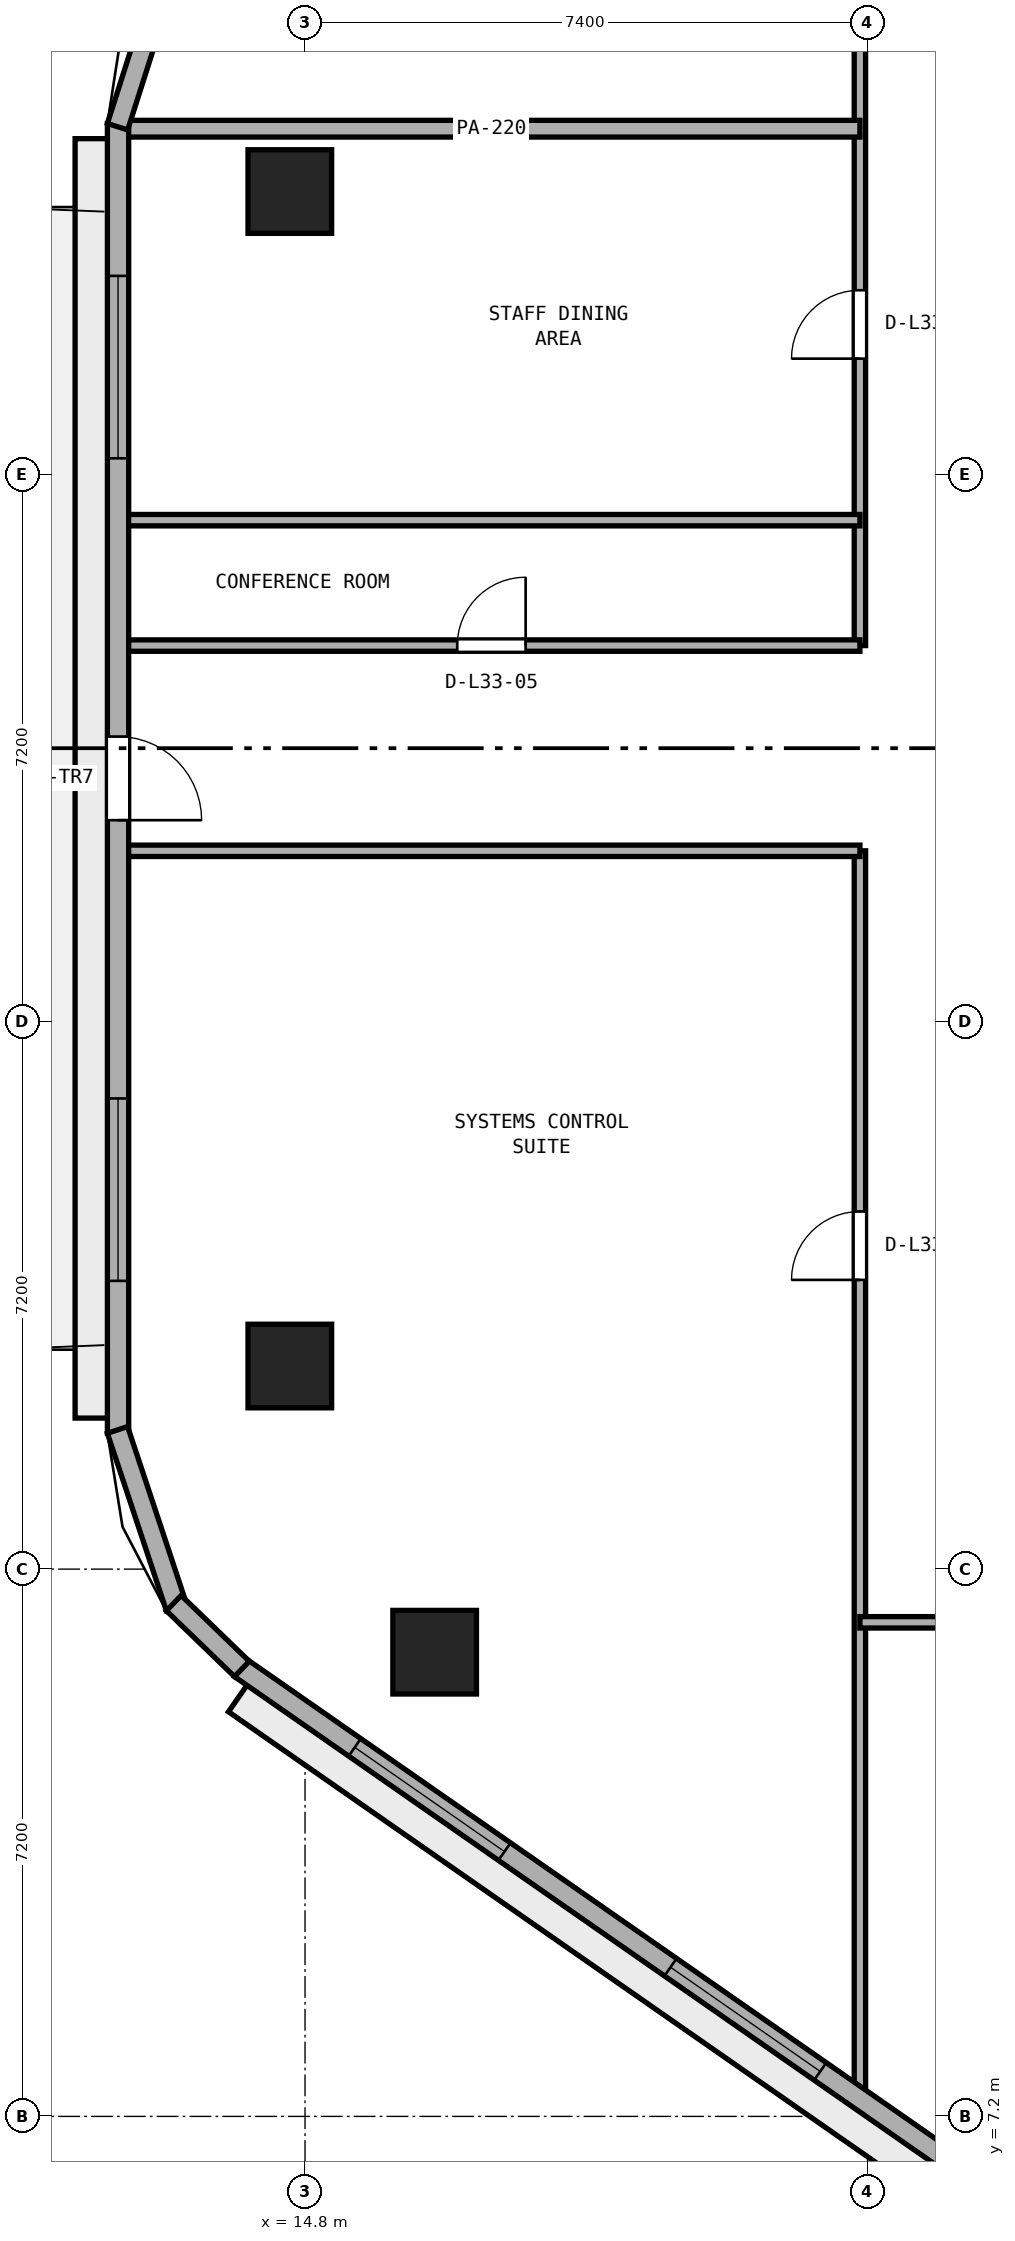
"""IFC4 building model, lengths in metres.
Left out: names, types, materials, properties, quantities, classifications, styles, units other than length and angle.
Written with IfcOpenShell. Run it as: python <this file> out.ifc"""

import sys

from ifc_helpers import new_model, si_unit, direction, frame, frame_2d, origin, origin_2d, place, context, subcontext, project, spatial, rectangle, extrude, element, fill, save


model = new_model("IFC4")
c1 = context("Model", 3, precision=1e-05, world=origin(), true_north=direction((0.0, 1.0)))
c2 = subcontext(c1, "Body", "Model", "MODEL_VIEW")
j1 = project(units=[si_unit("LENGTHUNIT", "METRE"), si_unit("PLANEANGLEUNIT", "RADIAN")], contexts=[c1])
p1 = place(None, origin())
s1 = spatial("IfcSite", under=j1, at=p1, CompositionType="ELEMENT")
p2 = place(p1, origin())
s2 = spatial("IfcBuilding", under=s1, at=p2, CompositionType="ELEMENT")
p3 = place(p2, frame((0.0, 0.0, 132.6)))
s3 = spatial("IfcBuildingStorey", under=s2, at=p3, CompositionType="ELEMENT", Elevation=132.6)
for number, where, z_axis, x_axis in (
    (1, (14.6, 32.523, 0.0), (0.0, 0.0, 1.0), (1.0, 0.0, 0.0)),
    (2, (14.6, 17.072, 0.0), (0.0, 0.0, 1.0), (1.0, 0.0, 0.0)),
    (3, (16.505, 13.307, 0.0), (0.0, 0.0, 1.0), (1.0, 0.0, 0.0)),
):
    element("IfcColumn", number, at=place(p3, frame(where, z_axis=z_axis, x_axis=x_axis)), inside=s3, PredefinedType="COLUMN", context=c2, shape_type="SweptSolid", body=[
        extrude(rectangle(XDim=1.1, YDim=1.1, at=origin_2d()), origin(), (0.0, 0.0, 1.0), 3.8),
    ])
p4 = place(p3, frame((22.1, 7.398, 0.0), z_axis=(0.0, 0.0, 1.0), x_axis=(0.0, 1.0, 0.0)))
e4 = element("IfcWall", 4, at=p4, inside=s3, PredefinedType="PARTITIONING", context=c2, shape_type="SweptSolid", body=[
    extrude(rectangle(XDim=16.452, YDim=0.15, at=frame_2d((8.226, 0.0))), origin(), (0.0, 0.0, 1.0), 3.54),
])
p5 = place(p4, frame((10.807, 0.0, 0.0)))
e5 = element("IfcOpeningElement", 5, at=p5, cuts=e4, PredefinedType="OPENING", context=c2, shape_type="SweptSolid", body=[
    extrude(rectangle(XDim=0.9, YDim=2.1, at=frame_2d((0.45, 1.05))), frame((0.0, 0.085, 0.0), z_axis=(0.0, -1.0, 0.0), x_axis=(1.0, 0.0, 0.0)), (0.0, 0.0, 1.0), 0.17),
])
p6 = place(p3, frame((22.1, 26.55, 0.0), z_axis=(0.0, 0.0, 1.0), x_axis=(0.0, 1.0, 0.0)))
e6 = element("IfcWall", 6, at=p6, inside=s3, PredefinedType="PARTITIONING", context=c2, shape_type="SweptSolid", body=[
    extrude(rectangle(XDim=10.15, YDim=0.15, at=frame_2d((5.075, 0.0))), origin(), (0.0, 0.0, 1.0), 3.54),
])
p7 = place(p6, frame((3.775, 0.0, 0.0)))
e7 = element("IfcOpeningElement", 7, at=p7, cuts=e6, PredefinedType="OPENING", context=c2, shape_type="SweptSolid", body=[
    extrude(rectangle(XDim=0.9, YDim=2.1, at=frame_2d((0.45, 1.05))), frame((0.0, 0.085, 0.0), z_axis=(0.0, -1.0, 0.0), x_axis=(1.0, 0.0, 0.0)), (0.0, 0.0, 1.0), 0.17),
])
p8 = place(p3, frame((22.1, 13.7, 0.0), z_axis=(0.0, 0.0, 1.0), x_axis=(1.0, 0.0, 0.0)))
e8 = element("IfcWall", 8, at=p8, inside=s3, PredefinedType="PARTITIONING", context=c2, shape_type="SweptSolid", body=[
    extrude(rectangle(XDim=12.3, YDim=0.15, at=frame_2d((6.15, 0.0))), origin(), (0.0, 0.0, 1.0), 3.54),
])
p9 = place(p8, frame((4.37, 0.0, 0.0)))
e9 = element("IfcOpeningElement", 9, at=p9, cuts=e8, PredefinedType="OPENING", context=c2, shape_type="SweptSolid", body=[
    extrude(rectangle(XDim=0.9, YDim=2.1, at=frame_2d((0.45, 1.05))), frame((0.0, 0.085, 0.0), z_axis=(0.0, -1.0, 0.0), x_axis=(1.0, 0.0, 0.0)), (0.0, 0.0, 1.0), 0.17),
])
p10 = place(p3, frame((12.405, 23.85, 0.0), z_axis=(0.0, 0.0, 1.0), x_axis=(1.0, 0.0, 0.0)))
e10 = element("IfcWall", 10, at=p10, inside=s3, PredefinedType="PARTITIONING", context=c2, shape_type="SweptSolid", body=[
    extrude(rectangle(XDim=9.695, YDim=0.15, at=frame_2d((4.848, 0.0))), origin(), (0.0, 0.0, 1.0), 3.54),
])
p11 = place(p3, frame((12.405, 26.55, 0.0), z_axis=(0.0, 0.0, 1.0), x_axis=(1.0, 0.0, 0.0)))
e11 = element("IfcWall", 11, at=p11, inside=s3, PredefinedType="PARTITIONING", context=c2, shape_type="SweptSolid", body=[
    extrude(rectangle(XDim=9.695, YDim=0.15, at=frame_2d((4.848, 0.0))), origin(), (0.0, 0.0, 1.0), 3.54),
])
p12 = place(p11, frame((4.397, 0.0, 0.0)))
e12 = element("IfcOpeningElement", 12, at=p12, cuts=e11, PredefinedType="OPENING", context=c2, shape_type="SweptSolid", body=[
    extrude(rectangle(XDim=0.9, YDim=2.1, at=frame_2d((0.45, 1.05))), frame((0.0, 0.085, 0.0), z_axis=(0.0, -1.0, 0.0), x_axis=(1.0, 0.0, 0.0)), (0.0, 0.0, 1.0), 0.17),
])
p13 = place(p3, frame((12.405, 28.2, 0.0), z_axis=(0.0, 0.0, 1.0), x_axis=(1.0, 0.0, 0.0)))
e13 = element("IfcWall", 13, at=p13, inside=s3, PredefinedType="PARTITIONING", context=c2, shape_type="SweptSolid", body=[
    extrude(rectangle(XDim=9.695, YDim=0.15, at=frame_2d((4.848, 0.0))), origin(), (0.0, 0.0, 1.0), 3.54),
])
p14 = place(p3, frame((12.405, 33.35, 0.0), z_axis=(0.0, 0.0, 1.0), x_axis=(1.0, 0.0, 0.0)))
e14 = element("IfcWall", 14, at=p14, inside=s3, PredefinedType="PARTITIONING", context=c2, shape_type="SweptSolid", body=[
    extrude(rectangle(XDim=9.695, YDim=0.22, at=frame_2d((4.848, 0.0))), origin(), (0.0, 0.0, 1.0), 2.79),
])
p15 = place(p3, frame((12.34, 33.419, 0.0), z_axis=(0.0, 0.0, 1.0), x_axis=(0.0, -1.0, 0.0)))
e15 = element("IfcWall", 15, at=p15, inside=s3, PredefinedType="STANDARD", context=c2, shape_type="SweptSolid", body=[
    extrude(rectangle(XDim=17.232, YDim=0.28, at=frame_2d((8.616, 0.0))), origin(), (0.0, 0.0, 1.0), 3.54),
])
p16 = place(p15, frame((8.066, 0.0, 0.0)))
e16 = element("IfcOpeningElement", 16, at=p16, cuts=e15, PredefinedType="OPENING", context=c2, shape_type="SweptSolid", body=[
    extrude(rectangle(XDim=1.1, YDim=2.2, at=frame_2d((0.55, 1.1))), frame((0.0, 0.15, 0.0), z_axis=(0.0, -1.0, 0.0), x_axis=(1.0, 0.0, 0.0)), (0.0, 0.0, 1.0), 0.3),
])
p17 = place(p15, frame((2.005, 0.0, 0.9)))
e17 = element("IfcOpeningElement", 17, at=p17, cuts=e15, PredefinedType="OPENING", context=c2, shape_type="SweptSolid", body=[
    extrude(rectangle(XDim=2.4, YDim=1.75, at=frame_2d((1.2, 0.875))), frame((0.0, 0.15, 0.0), z_axis=(0.0, -1.0, 0.0), x_axis=(1.0, 0.0, 0.0)), (0.0, 0.0, 1.0), 0.3),
])
p18 = place(p15, frame((12.827, 0.0, 0.9)))
e18 = element("IfcOpeningElement", 18, at=p18, cuts=e15, PredefinedType="OPENING", context=c2, shape_type="SweptSolid", body=[
    extrude(rectangle(XDim=2.4, YDim=1.75, at=frame_2d((1.2, 0.875))), frame((0.0, 0.15, 0.0), z_axis=(0.0, -1.0, 0.0), x_axis=(1.0, 0.0, 0.0)), (0.0, 0.0, 1.0), 0.3),
])
p19 = place(p3, frame((13.952, 13.101, 0.0), z_axis=(0.0, 0.0, 1.0), x_axis=(0.820698239491, -0.571361881558, 0.0)))
e19 = element("IfcWall", 19, at=p19, inside=s3, PredefinedType="STANDARD", context=c2, shape_type="SweptSolid", body=[
    extrude(rectangle(XDim=16.186, YDim=0.28, at=frame_2d((8.093, 0.0))), origin(), (0.0, 0.0, 1.0), 3.54),
])
p20 = place(p19, frame((1.831, 0.0, 0.9)))
e20 = element("IfcOpeningElement", 20, at=p20, cuts=e19, PredefinedType="OPENING", context=c2, shape_type="SweptSolid", body=[
    extrude(rectangle(XDim=2.4, YDim=1.75, at=frame_2d((1.2, 0.875))), frame((0.0, 0.15, 0.0), z_axis=(0.0, -1.0, 0.0), x_axis=(1.0, 0.0, 0.0)), (0.0, 0.0, 1.0), 0.3),
])
p21 = place(p19, frame((6.893, 0.0, 0.9)))
e21 = element("IfcOpeningElement", 21, at=p21, cuts=e19, PredefinedType="OPENING", context=c2, shape_type="SweptSolid", body=[
    extrude(rectangle(XDim=2.4, YDim=1.75, at=frame_2d((1.2, 0.875))), frame((0.0, 0.15, 0.0), z_axis=(0.0, -1.0, 0.0), x_axis=(1.0, 0.0, 0.0)), (0.0, 0.0, 1.0), 0.3),
])
p22 = place(p19, frame((11.955, 0.0, 0.9)))
e22 = element("IfcOpeningElement", 22, at=p22, cuts=e19, PredefinedType="OPENING", context=c2, shape_type="SweptSolid", body=[
    extrude(rectangle(XDim=2.4, YDim=1.75, at=frame_2d((1.2, 0.875))), frame((0.0, 0.15, 0.0), z_axis=(0.0, -1.0, 0.0), x_axis=(1.0, 0.0, 0.0)), (0.0, 0.0, 1.0), 0.3),
])
p23 = place(p3, frame((13.053, 35.634, 0.0), z_axis=(0.0, 0.0, 1.0), x_axis=(-0.303807416298, -0.952733464198, 0.0)))
e23 = element("IfcWall", 23, at=p23, inside=s3, PredefinedType="STANDARD", context=c2, shape_type="SweptSolid", body=[
    extrude(rectangle(XDim=2.37, YDim=0.28, at=frame_2d((1.185, 0.0))), origin(), (0.0, 0.0, 1.0), 3.54),
])
p24 = place(p3, frame((12.333, 16.231, 0.0), z_axis=(0.0, 0.0, 1.0), x_axis=(0.315364302967, -0.94897068259, 0.0)))
e24 = element("IfcWall", 24, at=p24, inside=s3, PredefinedType="STANDARD", context=c2, shape_type="SweptSolid", body=[
    extrude(rectangle(XDim=2.46, YDim=0.28, at=frame_2d((1.23, 0.0))), origin(), (0.0, 0.0, 1.0), 3.54),
])
p25 = place(p3, frame((13.073, 13.953, 0.0), z_axis=(0.0, 0.0, 1.0), x_axis=(0.718958999036, -0.695052485576, 0.0)))
e25 = element("IfcWall", 25, at=p25, inside=s3, PredefinedType="STANDARD", context=c2, shape_type="SweptSolid", body=[
    extrude(rectangle(XDim=1.246, YDim=0.28, at=frame_2d((0.623, 0.0))), origin(), (0.0, 0.0, 1.0), 3.54),
])
p26 = place(p5, origin())
e26 = element("IfcDoor", 26, at=p26, inside=s3, OperationType="SINGLE_SWING_LEFT", PredefinedType="DOOR", context=c2, shape_type="SweptSolid", body=[
    extrude(rectangle(XDim=0.9, YDim=2.1, at=frame_2d((0.45, 1.05))), frame((0.0, 0.025, 0.0), z_axis=(0.0, -1.0, 0.0), x_axis=(1.0, 0.0, 0.0)), (0.0, 0.0, 1.0), 0.05),
])
fill(e5, e26)
p27 = place(p12, origin())
e27 = element("IfcDoor", 27, at=p27, inside=s3, OperationType="SINGLE_SWING_RIGHT", PredefinedType="DOOR", context=c2, shape_type="SweptSolid", body=[
    extrude(rectangle(XDim=0.9, YDim=2.1, at=frame_2d((0.45, 1.05))), frame((0.0, 0.025, 0.0), z_axis=(0.0, -1.0, 0.0), x_axis=(1.0, 0.0, 0.0)), (0.0, 0.0, 1.0), 0.05),
])
fill(e12, e27)
p28 = place(p7, origin())
e28 = element("IfcDoor", 28, at=p28, inside=s3, OperationType="SINGLE_SWING_LEFT", PredefinedType="DOOR", context=c2, shape_type="SweptSolid", body=[
    extrude(rectangle(XDim=0.9, YDim=2.1, at=frame_2d((0.45, 1.05))), frame((0.0, 0.025, 0.0), z_axis=(0.0, -1.0, 0.0), x_axis=(1.0, 0.0, 0.0)), (0.0, 0.0, 1.0), 0.05),
])
fill(e7, e28)
p29 = place(p16, origin())
e29 = element("IfcDoor", 29, at=p29, inside=s3, OperationType="SINGLE_SWING_RIGHT", PredefinedType="DOOR", context=c2, shape_type="SweptSolid", body=[
    extrude(rectangle(XDim=1.1, YDim=2.2, at=frame_2d((0.55, 1.1))), frame((0.0, 0.025, 0.0), z_axis=(0.0, -1.0, 0.0), x_axis=(1.0, 0.0, 0.0)), (0.0, 0.0, 1.0), 0.05),
])
fill(e16, e29)
p30 = place(p17, origin())
e30 = element("IfcWindow", 30, at=p30, inside=s3, PartitioningType="SINGLE_PANEL", PredefinedType="WINDOW", context=c2, shape_type="SweptSolid", body=[
    extrude(rectangle(XDim=2.4, YDim=1.75, at=frame_2d((1.2, 0.875))), frame((0.0, 0.03, 0.0), z_axis=(0.0, -1.0, 0.0), x_axis=(1.0, 0.0, 0.0)), (0.0, 0.0, 1.0), 0.06),
])
fill(e17, e30)
p31 = place(p18, origin())
e31 = element("IfcWindow", 31, at=p31, inside=s3, PartitioningType="SINGLE_PANEL", PredefinedType="WINDOW", context=c2, shape_type="SweptSolid", body=[
    extrude(rectangle(XDim=2.4, YDim=1.75, at=frame_2d((1.2, 0.875))), frame((0.0, 0.03, 0.0), z_axis=(0.0, -1.0, 0.0), x_axis=(1.0, 0.0, 0.0)), (0.0, 0.0, 1.0), 0.06),
])
fill(e18, e31)
p32 = place(p20, origin())
e32 = element("IfcWindow", 32, at=p32, inside=s3, PartitioningType="SINGLE_PANEL", PredefinedType="WINDOW", context=c2, shape_type="SweptSolid", body=[
    extrude(rectangle(XDim=2.4, YDim=1.75, at=frame_2d((1.2, 0.875))), frame((0.0, 0.03, 0.0), z_axis=(0.0, -1.0, 0.0), x_axis=(1.0, 0.0, 0.0)), (0.0, 0.0, 1.0), 0.06),
])
fill(e20, e32)
p33 = place(p21, origin())
e33 = element("IfcWindow", 33, at=p33, inside=s3, PartitioningType="SINGLE_PANEL", PredefinedType="WINDOW", context=c2, shape_type="SweptSolid", body=[
    extrude(rectangle(XDim=2.4, YDim=1.75, at=frame_2d((1.2, 0.875))), frame((0.0, 0.03, 0.0), z_axis=(0.0, -1.0, 0.0), x_axis=(1.0, 0.0, 0.0)), (0.0, 0.0, 1.0), 0.06),
])
fill(e21, e33)
save(model, sys.argv[1])
